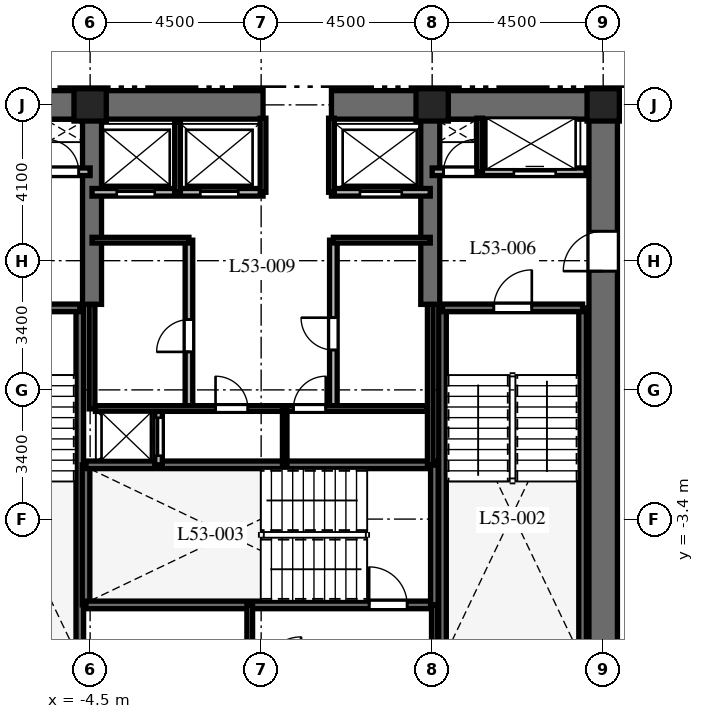
"""IFC4 building model, lengths in metres.
Left out: names, types, materials, properties, quantities, classifications, styles, units other than length and angle.
Written with IfcOpenShell. Run it as: python <this file> out.ifc"""

import sys

from ifc_helpers import new_model, si_unit, direction, frame, frame_2d, origin, origin_2d, place, context, subcontext, project, spatial, rectangle, extrude, element, fill, save


model = new_model("IFC4")
c1 = context("Model", 3, precision=1e-05, world=origin(), true_north=direction((0.0, 1.0)))
c2 = subcontext(c1, "Body", "Model", "MODEL_VIEW")
j1 = project(units=[si_unit("LENGTHUNIT", "METRE"), si_unit("PLANEANGLEUNIT", "RADIAN")], contexts=[c1])
p1 = place(None, origin())
s1 = spatial("IfcSite", under=j1, at=p1, CompositionType="ELEMENT")
p2 = place(p1, origin())
s2 = spatial("IfcBuilding", under=s1, at=p2, CompositionType="ELEMENT")
p3 = place(p2, frame((0.0, 0.0, 214.1)))
s3 = spatial("IfcBuildingStorey", under=s2, at=p3, CompositionType="ELEMENT", Elevation=214.1)
p4 = place(p3, frame((-9.375, 7.5, 0.0), z_axis=(0.0, 0.0, 1.0), x_axis=(1.0, 0.0, 0.0)))
e1 = element("IfcWall", 1, at=p4, inside=s3, PredefinedType="SHEAR", context=c2, shape_type="SweptSolid", body=[
    extrude(rectangle(XDim=9.425, YDim=0.75, at=frame_2d((4.712, 0.0))), origin(), (0.0, 0.0, 1.0), 3.8),
])
p5 = place(p3, frame((1.85, 7.5, 0.0), z_axis=(0.0, 0.0, 1.0), x_axis=(1.0, 0.0, 0.0)))
e2 = element("IfcWall", 2, at=p5, inside=s3, PredefinedType="SHEAR", context=c2, shape_type="SweptSolid", body=[
    extrude(rectangle(XDim=7.525, YDim=0.75, at=frame_2d((3.762, 0.0))), origin(), (0.0, 0.0, 1.0), 3.8),
])
p6 = place(p3, frame((9.0, -7.125, 0.0), z_axis=(0.0, 0.0, 1.0), x_axis=(0.0, 1.0, 0.0)))
e3 = element("IfcWall", 3, at=p6, inside=s3, PredefinedType="SHEAR", context=c2, shape_type="SweptSolid", body=[
    extrude(rectangle(XDim=14.25, YDim=0.75, at=frame_2d((7.125, 0.0))), origin(), (0.0, 0.0, 1.0), 3.8),
])
p7 = place(p6, frame((10.25, 0.0, 0.0)))
e4 = element("IfcOpeningElement", 4, at=p7, cuts=e3, PredefinedType="OPENING", context=c2, shape_type="SweptSolid", body=[
    extrude(rectangle(XDim=1.05, YDim=2.15, at=frame_2d((0.525, 1.075))), frame((0.0, 0.385, 0.0), z_axis=(0.0, -1.0, 0.0), x_axis=(1.0, 0.0, 0.0)), (0.0, 0.0, 1.0), 0.77),
])
for number, where, z_axis, x_axis in (
    (5, (-4.45, 2.25, 0.0), (0.0, 0.0, 1.0), (0.0, 1.0, 0.0)),
    (6, (4.45, 2.25, 0.0), (0.0, 0.0, 1.0), (0.0, 1.0, 0.0)),
):
    element("IfcWall", number, at=place(p3, frame(where, z_axis=z_axis, x_axis=x_axis)), inside=s3, PredefinedType="SHEAR", context=c2, shape_type="SweptSolid", body=[
        extrude(rectangle(XDim=4.875, YDim=0.5, at=frame_2d((2.438, 0.0))), origin(), (0.0, 0.0, 1.0), 3.8),
    ])
p8 = place(p3, frame((-4.772, -6.985, 0.0), z_axis=(0.0, 0.0, 1.0), x_axis=(0.0, 1.0, 0.0)))
e7 = element("IfcWall", 7, at=p8, inside=s3, PredefinedType="SHEAR", context=c2, shape_type="SweptSolid", body=[
    extrude(rectangle(XDim=9.143, YDim=0.2, at=frame_2d((4.572, 0.0))), origin(), (0.0, 0.0, 1.0), 3.8),
])
p9 = place(p3, frame((-8.458, 2.158, 0.0), z_axis=(0.0, 0.0, 1.0), x_axis=(1.0, 0.0, 0.0)))
e8 = element("IfcWall", 8, at=p9, inside=s3, PredefinedType="SHEAR", context=c2, shape_type="SweptSolid", body=[
    extrude(rectangle(XDim=3.686, YDim=0.2, at=frame_2d((1.843, 0.0))), origin(), (0.0, 0.0, 1.0), 3.8),
])
p10 = place(p9, frame((1.3, 0.0, 0.0)))
e9 = element("IfcOpeningElement", 9, at=p10, cuts=e8, PredefinedType="OPENING", context=c2, shape_type="SweptSolid", body=[
    extrude(rectangle(XDim=1.0, YDim=2.15, at=frame_2d((0.5, 1.075))), frame((0.0, 0.11, 0.0), z_axis=(0.0, -1.0, 0.0), x_axis=(1.0, 0.0, 0.0)), (0.0, 0.0, 1.0), 0.22),
])
for number, where, z_axis, x_axis in (
    (10, (4.772, -6.985, 0.0), (0.0, 0.0, 1.0), (0.0, 1.0, 0.0)),
    (11, (8.458, -6.985, 0.0), (0.0, 0.0, 1.0), (0.0, 1.0, 0.0)),
):
    element("IfcWall", number, at=place(p3, frame(where, z_axis=z_axis, x_axis=x_axis)), inside=s3, PredefinedType="SHEAR", context=c2, shape_type="SweptSolid", body=[
        extrude(rectangle(XDim=9.143, YDim=0.2, at=frame_2d((4.572, 0.0))), origin(), (0.0, 0.0, 1.0), 3.8),
    ])
p11 = place(p3, frame((4.772, 2.158, 0.0), z_axis=(0.0, 0.0, 1.0), x_axis=(1.0, 0.0, 0.0)))
e12 = element("IfcWall", 12, at=p11, inside=s3, PredefinedType="SHEAR", context=c2, shape_type="SweptSolid", body=[
    extrude(rectangle(XDim=3.686, YDim=0.2, at=frame_2d((1.843, 0.0))), origin(), (0.0, 0.0, 1.0), 3.8),
])
p12 = place(p11, frame((1.35, 0.0, 0.0)))
e13 = element("IfcOpeningElement", 13, at=p12, cuts=e12, PredefinedType="OPENING", context=c2, shape_type="SweptSolid", body=[
    extrude(rectangle(XDim=1.0, YDim=2.15, at=frame_2d((0.5, 1.075))), frame((0.0, 0.11, 0.0), z_axis=(0.0, -1.0, 0.0), x_axis=(1.0, 0.0, 0.0)), (0.0, 0.0, 1.0), 0.22),
])
p13 = place(p3, frame((-4.608, -5.658, 0.0), z_axis=(0.0, 0.0, 1.0), x_axis=(0.0, 1.0, 0.0)))
e14 = element("IfcWall", 14, at=p13, inside=s3, PredefinedType="SHEAR", context=c2, shape_type="SweptSolid", body=[
    extrude(rectangle(XDim=3.686, YDim=0.2, at=frame_2d((1.843, 0.0))), origin(), (0.0, 0.0, 1.0), 3.8),
])
p14 = place(p3, frame((-4.608, -5.658, 0.0), z_axis=(0.0, 0.0, 1.0), x_axis=(1.0, 0.0, 0.0)))
e15 = element("IfcWall", 15, at=p14, inside=s3, PredefinedType="SHEAR", context=c2, shape_type="SweptSolid", body=[
    extrude(rectangle(XDim=9.166, YDim=0.2, at=frame_2d((4.583, 0.0))), origin(), (0.0, 0.0, 1.0), 3.8),
])
p15 = place(p14, frame((7.45, 0.0, 0.0)))
e16 = element("IfcOpeningElement", 16, at=p15, cuts=e15, PredefinedType="OPENING", context=c2, shape_type="SweptSolid", body=[
    extrude(rectangle(XDim=1.0, YDim=2.15, at=frame_2d((0.5, 1.075))), frame((0.0, 0.11, 0.0), z_axis=(0.0, -1.0, 0.0), x_axis=(1.0, 0.0, 0.0)), (0.0, 0.0, 1.0), 0.22),
])
p16 = place(p3, frame((-4.608, -1.972, 0.0), z_axis=(0.0, 0.0, 1.0), x_axis=(1.0, 0.0, 0.0)))
e17 = element("IfcWall", 17, at=p16, inside=s3, PredefinedType="SHEAR", context=c2, shape_type="SweptSolid", body=[
    extrude(rectangle(XDim=9.166, YDim=0.2, at=frame_2d((4.583, 0.0))), origin(), (0.0, 0.0, 1.0), 3.8),
])
p17 = place(p3, frame((4.558, -5.658, 0.0), z_axis=(0.0, 0.0, 1.0), x_axis=(0.0, 1.0, 0.0)))
e18 = element("IfcWall", 18, at=p17, inside=s3, PredefinedType="SHEAR", context=c2, shape_type="SweptSolid", body=[
    extrude(rectangle(XDim=3.686, YDim=0.2, at=frame_2d((1.843, 0.0))), origin(), (0.0, 0.0, 1.0), 3.8),
])
for number, where, z_axis, x_axis in (
    (19, (9.0, 7.5, 0.0), (0.0, 0.0, 1.0), (1.0, 0.0, 0.0)),
    (20, (4.5, 7.5, 0.0), (0.0, 0.0, 1.0), (1.0, 0.0, 0.0)),
    (21, (-4.5, 7.5, 0.0), (0.0, 0.0, 1.0), (1.0, 0.0, 0.0)),
):
    element("IfcColumn", number, at=place(p3, frame(where, z_axis=z_axis, x_axis=x_axis)), inside=s3, PredefinedType="COLUMN", context=c2, shape_type="SweptSolid", body=[
        extrude(rectangle(XDim=0.85, YDim=0.85, at=origin_2d()), origin(), (0.0, 0.0, 1.0), 3.8),
    ])
for number, where, z_axis, x_axis in (
    (22, (-0.3, -7.02, 0.0), (0.0, 0.0, 1.0), (0.0, 1.0, 0.0)),
    (23, (4.558, -7.02, 0.0), (0.0, 0.0, 1.0), (0.0, 1.0, 0.0)),
):
    element("IfcWall", number, at=place(p3, frame(where, z_axis=z_axis, x_axis=x_axis)), inside=s3, PredefinedType="PARTITIONING", context=c2, shape_type="SweptSolid", body=[
        extrude(rectangle(XDim=1.362, YDim=0.15, at=frame_2d((0.681, 0.0))), origin(), (0.0, 0.0, 1.0), 3.5),
    ])
p18 = place(p3, frame((-8.55, 5.74, 0.0), z_axis=(0.0, 0.0, 1.0), x_axis=(1.0, 0.0, 0.0)))
e24 = element("IfcWall", 24, at=p18, inside=s3, PredefinedType="PARTITIONING", context=c2, shape_type="SweptSolid", body=[
    extrude(rectangle(XDim=4.05, YDim=0.2, at=frame_2d((2.025, 0.0))), origin(), (0.0, 0.0, 1.0), 3.5),
])
p19 = place(p18, frame((0.75, 0.0, 0.0)))
e25 = element("IfcOpeningElement", 25, at=p19, cuts=e24, PredefinedType="OPENING", context=c2, shape_type="SweptSolid", body=[
    extrude(rectangle(XDim=1.1, YDim=2.2, at=frame_2d((0.55, 1.1))), frame((0.0, 0.11, 0.0), z_axis=(0.0, -1.0, 0.0), x_axis=(1.0, 0.0, 0.0)), (0.0, 0.0, 1.0), 0.22),
])
p20 = place(p18, frame((2.9, 0.0, 0.0)))
e26 = element("IfcOpeningElement", 26, at=p20, cuts=e24, PredefinedType="OPENING", context=c2, shape_type="SweptSolid", body=[
    extrude(rectangle(XDim=0.85, YDim=2.03, at=frame_2d((0.425, 1.015))), frame((0.0, 0.11, 0.0), z_axis=(0.0, -1.0, 0.0), x_axis=(1.0, 0.0, 0.0)), (0.0, 0.0, 1.0), 0.22),
])
p21 = place(p3, frame((4.5, 5.74, 0.0), z_axis=(0.0, 0.0, 1.0), x_axis=(1.0, 0.0, 0.0)))
e27 = element("IfcWall", 27, at=p21, inside=s3, PredefinedType="PARTITIONING", context=c2, shape_type="SweptSolid", body=[
    extrude(rectangle(XDim=4.05, YDim=0.2, at=frame_2d((2.025, 0.0))), origin(), (0.0, 0.0, 1.0), 3.5),
])
p22 = place(p21, frame((0.3, 0.0, 0.0)))
e28 = element("IfcOpeningElement", 28, at=p22, cuts=e27, PredefinedType="OPENING", context=c2, shape_type="SweptSolid", body=[
    extrude(rectangle(XDim=0.85, YDim=2.03, at=frame_2d((0.425, 1.015))), frame((0.0, 0.11, 0.0), z_axis=(0.0, -1.0, 0.0), x_axis=(1.0, 0.0, 0.0)), (0.0, 0.0, 1.0), 0.22),
])
p23 = place(p21, frame((2.15, 0.0, 0.0)))
e29 = element("IfcOpeningElement", 29, at=p23, cuts=e27, PredefinedType="OPENING", context=c2, shape_type="SweptSolid", body=[
    extrude(rectangle(XDim=1.1, YDim=2.2, at=frame_2d((0.55, 1.1))), frame((0.0, 0.11, 0.0), z_axis=(0.0, -1.0, 0.0), x_axis=(1.0, 0.0, 0.0)), (0.0, 0.0, 1.0), 0.22),
])
p24 = place(p3, frame((5.75, 5.74, 0.0), z_axis=(0.0, 0.0, 1.0), x_axis=(0.0, 1.0, 0.0)))
e30 = element("IfcWall", 30, at=p24, inside=s3, PredefinedType="PARTITIONING", context=c2, shape_type="SweptSolid", body=[
    extrude(rectangle(XDim=1.41, YDim=0.15, at=frame_2d((0.705, 0.0))), origin(), (0.0, 0.0, 1.0), 3.5),
])
p25 = place(p3, frame((-2.7, -1.972, 0.0), z_axis=(0.0, 0.0, 1.0), x_axis=(0.0, 1.0, 0.0)))
e31 = element("IfcWall", 31, at=p25, inside=s3, PredefinedType="PARTITIONING", context=c2, shape_type="SweptSolid", body=[
    extrude(rectangle(XDim=1.472, YDim=0.2, at=frame_2d((0.736, 0.0))), origin(), (0.0, 0.0, 1.0), 3.5),
])
p26 = place(p25, frame((0.24, 0.0, 0.0)))
e32 = element("IfcOpeningElement", 32, at=p26, cuts=e31, PredefinedType="OPENING", context=c2, shape_type="SweptSolid", body=[
    extrude(rectangle(XDim=1.0, YDim=2.2, at=frame_2d((0.5, 1.1))), frame((0.0, 0.11, 0.0), z_axis=(0.0, -1.0, 0.0), x_axis=(1.0, 0.0, 0.0)), (0.0, 0.0, 1.0), 0.22),
])
p27 = place(p3, frame((-4.45, 5.2, 0.0), z_axis=(0.0, 0.0, 1.0), x_axis=(1.0, 0.0, 0.0)))
e33 = element("IfcWall", 33, at=p27, inside=s3, PredefinedType="PARTITIONING", context=c2, shape_type="SweptSolid", body=[
    extrude(rectangle(XDim=4.5, YDim=0.2, at=frame_2d((2.25, 0.0))), origin(), (0.0, 0.0, 1.0), 3.5),
])
p28 = place(p27, frame((0.65, 0.0, 0.0)))
e34 = element("IfcOpeningElement", 34, at=p28, cuts=e33, PredefinedType="OPENING", context=c2, shape_type="SweptSolid", body=[
    extrude(rectangle(XDim=1.0, YDim=2.2, at=frame_2d((0.5, 1.1))), frame((0.0, 0.11, 0.0), z_axis=(0.0, -1.0, 0.0), x_axis=(1.0, 0.0, 0.0)), (0.0, 0.0, 1.0), 0.22),
])
p29 = place(p27, frame((2.85, 0.0, 0.0)))
e35 = element("IfcOpeningElement", 35, at=p29, cuts=e33, PredefinedType="OPENING", context=c2, shape_type="SweptSolid", body=[
    extrude(rectangle(XDim=1.0, YDim=2.2, at=frame_2d((0.5, 1.1))), frame((0.0, 0.11, 0.0), z_axis=(0.0, -1.0, 0.0), x_axis=(1.0, 0.0, 0.0)), (0.0, 0.0, 1.0), 0.22),
])
p30 = place(p3, frame((1.85, 5.2, 0.0), z_axis=(0.0, 0.0, 1.0), x_axis=(1.0, 0.0, 0.0)))
e36 = element("IfcWall", 36, at=p30, inside=s3, PredefinedType="PARTITIONING", context=c2, shape_type="SweptSolid", body=[
    extrude(rectangle(XDim=2.6, YDim=0.2, at=frame_2d((1.3, 0.0))), origin(), (0.0, 0.0, 1.0), 3.5),
])
p31 = place(p30, frame((0.75, 0.0, 0.0)))
e37 = element("IfcOpeningElement", 37, at=p31, cuts=e36, PredefinedType="OPENING", context=c2, shape_type="SweptSolid", body=[
    extrude(rectangle(XDim=1.1, YDim=2.2, at=frame_2d((0.55, 1.1))), frame((0.0, 0.11, 0.0), z_axis=(0.0, -1.0, 0.0), x_axis=(1.0, 0.0, 0.0)), (0.0, 0.0, 1.0), 0.22),
])
p32 = place(p3, frame((-2.2, 5.2, 0.0), z_axis=(0.0, 0.0, 1.0), x_axis=(0.0, 1.0, 0.0)))
e38 = element("IfcWall", 38, at=p32, inside=s3, PredefinedType="PARTITIONING", context=c2, shape_type="SweptSolid", body=[
    extrude(rectangle(XDim=1.85, YDim=0.15, at=frame_2d((0.925, 0.0))), origin(), (0.0, 0.0, 1.0), 3.5),
])
for number, where, z_axis, x_axis in (
    (39, (0.05, 5.2, 0.0), (0.0, 0.0, 1.0), (0.0, 1.0, 0.0)),
    (40, (1.85, 5.2, 0.0), (0.0, 0.0, 1.0), (0.0, 1.0, 0.0)),
):
    element("IfcWall", number, at=place(p3, frame(where, z_axis=z_axis, x_axis=x_axis)), inside=s3, PredefinedType="PARTITIONING", context=c2, shape_type="SweptSolid", body=[
        extrude(rectangle(XDim=1.95, YDim=0.15, at=frame_2d((0.975, 0.0))), origin(), (0.0, 0.0, 1.0), 3.5),
    ])
p33 = place(p3, frame((-4.45, -0.5, 0.0), z_axis=(0.0, 0.0, 1.0), x_axis=(0.0, 1.0, 0.0)))
e41 = element("IfcWall", 41, at=p33, inside=s3, PredefinedType="PARTITIONING", context=c2, shape_type="SweptSolid", body=[
    extrude(rectangle(XDim=2.75, YDim=0.15, at=frame_2d((1.375, 0.0))), origin(), (0.0, 0.0, 1.0), 3.5),
])
p34 = place(p3, frame((4.45, -1.972, 0.0), z_axis=(0.0, 0.0, 1.0), x_axis=(0.0, 1.0, 0.0)))
e42 = element("IfcWall", 42, at=p34, inside=s3, PredefinedType="PARTITIONING", context=c2, shape_type="SweptSolid", body=[
    extrude(rectangle(XDim=4.222, YDim=0.15, at=frame_2d((2.111, 0.0))), origin(), (0.0, 0.0, 1.0), 3.5),
])
p35 = place(p3, frame((-1.9, -0.5, 0.0), z_axis=(0.0, 0.0, 1.0), x_axis=(0.0, 1.0, 0.0)))
e43 = element("IfcWall", 43, at=p35, inside=s3, PredefinedType="PARTITIONING", context=c2, shape_type="SweptSolid", body=[
    extrude(rectangle(XDim=4.44, YDim=0.2, at=frame_2d((2.22, 0.0))), origin(), (0.0, 0.0, 1.0), 3.5),
])
p36 = place(p35, frame((1.5, 0.0, 0.0)))
e44 = element("IfcOpeningElement", 44, at=p36, cuts=e43, PredefinedType="OPENING", context=c2, shape_type="SweptSolid", body=[
    extrude(rectangle(XDim=0.85, YDim=2.03, at=frame_2d((0.425, 1.015))), frame((0.0, 0.11, 0.0), z_axis=(0.0, -1.0, 0.0), x_axis=(1.0, 0.0, 0.0)), (0.0, 0.0, 1.0), 0.22),
])
p37 = place(p3, frame((-4.45, 3.94, 0.0), z_axis=(0.0, 0.0, 1.0), x_axis=(1.0, 0.0, 0.0)))
e45 = element("IfcWall", 45, at=p37, inside=s3, PredefinedType="PARTITIONING", context=c2, shape_type="SweptSolid", body=[
    extrude(rectangle(XDim=2.55, YDim=0.15, at=frame_2d((1.275, 0.0))), origin(), (0.0, 0.0, 1.0), 3.5),
])
p38 = place(p3, frame((1.9, -0.5, 0.0), z_axis=(0.0, 0.0, 1.0), x_axis=(0.0, 1.0, 0.0)))
e46 = element("IfcWall", 46, at=p38, inside=s3, PredefinedType="PARTITIONING", context=c2, shape_type="SweptSolid", body=[
    extrude(rectangle(XDim=4.44, YDim=0.2, at=frame_2d((2.22, 0.0))), origin(), (0.0, 0.0, 1.0), 3.5),
])
p39 = place(p38, frame((1.55, 0.0, 0.0)))
e47 = element("IfcOpeningElement", 47, at=p39, cuts=e46, PredefinedType="OPENING", context=c2, shape_type="SweptSolid", body=[
    extrude(rectangle(XDim=0.85, YDim=2.03, at=frame_2d((0.425, 1.015))), frame((0.0, 0.11, 0.0), z_axis=(0.0, -1.0, 0.0), x_axis=(1.0, 0.0, 0.0)), (0.0, 0.0, 1.0), 0.22),
])
p40 = place(p3, frame((1.9, 3.94, 0.0), z_axis=(0.0, 0.0, 1.0), x_axis=(1.0, 0.0, 0.0)))
e48 = element("IfcWall", 48, at=p40, inside=s3, PredefinedType="PARTITIONING", context=c2, shape_type="SweptSolid", body=[
    extrude(rectangle(XDim=2.55, YDim=0.15, at=frame_2d((1.275, 0.0))), origin(), (0.0, 0.0, 1.0), 3.5),
])
p41 = place(p3, frame((-4.36, -0.49, 0.0), z_axis=(0.0, 0.0, 1.0), x_axis=(1.0, 0.0, 0.0)))
e49 = element("IfcWall", 49, at=p41, inside=s3, PredefinedType="PARTITIONING", context=c2, shape_type="SweptSolid", body=[
    extrude(rectangle(XDim=8.72, YDim=0.15, at=frame_2d((4.36, 0.0))), origin(), (0.0, 0.0, 1.0), 3.5),
])
p42 = place(p41, frame((3.16, 0.0, 0.0)))
e50 = element("IfcOpeningElement", 50, at=p42, cuts=e49, PredefinedType="OPENING", context=c2, shape_type="SweptSolid", body=[
    extrude(rectangle(XDim=0.85, YDim=2.03, at=frame_2d((0.425, 1.015))), frame((0.0, 0.085, 0.0), z_axis=(0.0, -1.0, 0.0), x_axis=(1.0, 0.0, 0.0)), (0.0, 0.0, 1.0), 0.17),
])
p43 = place(p41, frame((5.21, 0.0, 0.0)))
e51 = element("IfcOpeningElement", 51, at=p43, cuts=e49, PredefinedType="OPENING", context=c2, shape_type="SweptSolid", body=[
    extrude(rectangle(XDim=0.85, YDim=2.03, at=frame_2d((0.425, 1.015))), frame((0.0, 0.085, 0.0), z_axis=(0.0, -1.0, 0.0), x_axis=(1.0, 0.0, 0.0)), (0.0, 0.0, 1.0), 0.17),
])
p44 = place(p3, frame((0.62, -1.972, 0.0), z_axis=(0.0, 0.0, 1.0), x_axis=(0.0, 1.0, 0.0)))
e52 = element("IfcWall", 52, at=p44, inside=s3, PredefinedType="PARTITIONING", context=c2, shape_type="SweptSolid", body=[
    extrude(rectangle(XDim=1.472, YDim=0.12, at=frame_2d((0.736, 0.0))), origin(), (0.0, 0.0, 1.0), 3.5),
])
p45 = place(p12, origin())
e53 = element("IfcDoor", 53, at=p45, inside=s3, OperationType="SINGLE_SWING_RIGHT", PredefinedType="DOOR", context=c2, shape_type="SweptSolid", body=[
    extrude(rectangle(XDim=1.0, YDim=2.15, at=frame_2d((0.5, 1.075))), frame((0.0, 0.025, 0.0), z_axis=(0.0, -1.0, 0.0), x_axis=(1.0, 0.0, 0.0)), (0.0, 0.0, 1.0), 0.05),
])
fill(e13, e53)
p46 = place(p15, origin())
e54 = element("IfcDoor", 54, at=p46, inside=s3, OperationType="SINGLE_SWING_LEFT", PredefinedType="DOOR", context=c2, shape_type="SweptSolid", body=[
    extrude(rectangle(XDim=1.0, YDim=2.15, at=frame_2d((0.5, 1.075))), frame((0.0, 0.025, 0.0), z_axis=(0.0, -1.0, 0.0), x_axis=(1.0, 0.0, 0.0)), (0.0, 0.0, 1.0), 0.05),
])
fill(e16, e54)
p47 = place(p7, origin())
e55 = element("IfcDoor", 55, at=p47, inside=s3, OperationType="SINGLE_SWING_LEFT", PredefinedType="DOOR", context=c2, shape_type="SweptSolid", body=[
    extrude(rectangle(XDim=1.05, YDim=2.15, at=frame_2d((0.525, 1.075))), frame((0.0, 0.025, 0.0), z_axis=(0.0, -1.0, 0.0), x_axis=(1.0, 0.0, 0.0)), (0.0, 0.0, 1.0), 0.05),
])
fill(e4, e55)
p48 = place(p20, origin())
e56 = element("IfcDoor", 56, at=p48, inside=s3, OperationType="SINGLE_SWING_LEFT", PredefinedType="DOOR", context=c2, shape_type="SweptSolid", body=[
    extrude(rectangle(XDim=0.85, YDim=2.03, at=frame_2d((0.425, 1.015))), frame((0.0, 0.025, 0.0), z_axis=(0.0, -1.0, 0.0), x_axis=(1.0, 0.0, 0.0)), (0.0, 0.0, 1.0), 0.05),
])
fill(e26, e56)
p49 = place(p22, origin())
e57 = element("IfcDoor", 57, at=p49, inside=s3, OperationType="SINGLE_SWING_RIGHT", PredefinedType="DOOR", context=c2, shape_type="SweptSolid", body=[
    extrude(rectangle(XDim=0.85, YDim=2.03, at=frame_2d((0.425, 1.015))), frame((0.0, 0.025, 0.0), z_axis=(0.0, -1.0, 0.0), x_axis=(1.0, 0.0, 0.0)), (0.0, 0.0, 1.0), 0.05),
])
fill(e28, e57)
p50 = place(p23, origin())
e58 = element("IfcDoor", 58, at=p50, inside=s3, OperationType="SLIDING_TO_RIGHT", PredefinedType="DOOR", context=c2, shape_type="SweptSolid", body=[
    extrude(rectangle(XDim=1.1, YDim=2.2, at=frame_2d((0.55, 1.1))), frame((0.0, 0.025, 0.0), z_axis=(0.0, -1.0, 0.0), x_axis=(1.0, 0.0, 0.0)), (0.0, 0.0, 1.0), 0.05),
])
fill(e29, e58)
p51 = place(p26, origin())
e59 = element("IfcDoor", 59, at=p51, inside=s3, OperationType="SLIDING_TO_LEFT", PredefinedType="DOOR", context=c2, shape_type="SweptSolid", body=[
    extrude(rectangle(XDim=1.0, YDim=2.2, at=frame_2d((0.5, 1.1))), frame((0.0, 0.025, 0.0), z_axis=(0.0, -1.0, 0.0), x_axis=(1.0, 0.0, 0.0)), (0.0, 0.0, 1.0), 0.05),
])
fill(e32, e59)
p52 = place(p28, origin())
e60 = element("IfcDoor", 60, at=p52, inside=s3, OperationType="SLIDING_TO_LEFT", PredefinedType="DOOR", context=c2, shape_type="SweptSolid", body=[
    extrude(rectangle(XDim=1.0, YDim=2.2, at=frame_2d((0.5, 1.1))), frame((0.0, 0.025, 0.0), z_axis=(0.0, -1.0, 0.0), x_axis=(1.0, 0.0, 0.0)), (0.0, 0.0, 1.0), 0.05),
])
fill(e34, e60)
p53 = place(p29, origin())
e61 = element("IfcDoor", 61, at=p53, inside=s3, OperationType="SLIDING_TO_RIGHT", PredefinedType="DOOR", context=c2, shape_type="SweptSolid", body=[
    extrude(rectangle(XDim=1.0, YDim=2.2, at=frame_2d((0.5, 1.1))), frame((0.0, 0.025, 0.0), z_axis=(0.0, -1.0, 0.0), x_axis=(1.0, 0.0, 0.0)), (0.0, 0.0, 1.0), 0.05),
])
fill(e35, e61)
p54 = place(p31, origin())
e62 = element("IfcDoor", 62, at=p54, inside=s3, OperationType="SLIDING_TO_RIGHT", PredefinedType="DOOR", context=c2, shape_type="SweptSolid", body=[
    extrude(rectangle(XDim=1.1, YDim=2.2, at=frame_2d((0.55, 1.1))), frame((0.0, 0.025, 0.0), z_axis=(0.0, -1.0, 0.0), x_axis=(1.0, 0.0, 0.0)), (0.0, 0.0, 1.0), 0.05),
])
fill(e37, e62)
p55 = place(p36, origin())
e63 = element("IfcDoor", 63, at=p55, inside=s3, OperationType="SINGLE_SWING_LEFT", PredefinedType="DOOR", context=c2, shape_type="SweptSolid", body=[
    extrude(rectangle(XDim=0.85, YDim=2.03, at=frame_2d((0.425, 1.015))), frame((0.0, 0.025, 0.0), z_axis=(0.0, -1.0, 0.0), x_axis=(1.0, 0.0, 0.0)), (0.0, 0.0, 1.0), 0.05),
])
fill(e44, e63)
p56 = place(p39, origin())
e64 = element("IfcDoor", 64, at=p56, inside=s3, OperationType="SINGLE_SWING_RIGHT", PredefinedType="DOOR", context=c2, shape_type="SweptSolid", body=[
    extrude(rectangle(XDim=0.85, YDim=2.03, at=frame_2d((0.425, 1.015))), frame((0.0, 0.025, 0.0), z_axis=(0.0, -1.0, 0.0), x_axis=(1.0, 0.0, 0.0)), (0.0, 0.0, 1.0), 0.05),
])
fill(e47, e64)
p57 = place(p42, origin())
e65 = element("IfcDoor", 65, at=p57, inside=s3, OperationType="SINGLE_SWING_LEFT", PredefinedType="DOOR", context=c2, shape_type="SweptSolid", body=[
    extrude(rectangle(XDim=0.85, YDim=2.03, at=frame_2d((0.425, 1.015))), frame((0.0, 0.025, 0.0), z_axis=(0.0, -1.0, 0.0), x_axis=(1.0, 0.0, 0.0)), (0.0, 0.0, 1.0), 0.05),
])
fill(e50, e65)
p58 = place(p43, origin())
e66 = element("IfcDoor", 66, at=p58, inside=s3, OperationType="SINGLE_SWING_RIGHT", PredefinedType="DOOR", context=c2, shape_type="SweptSolid", body=[
    extrude(rectangle(XDim=0.85, YDim=2.03, at=frame_2d((0.425, 1.015))), frame((0.0, 0.025, 0.0), z_axis=(0.0, -1.0, 0.0), x_axis=(1.0, 0.0, 0.0)), (0.0, 0.0, 1.0), 0.05),
])
fill(e51, e66)
save(model, sys.argv[1])
